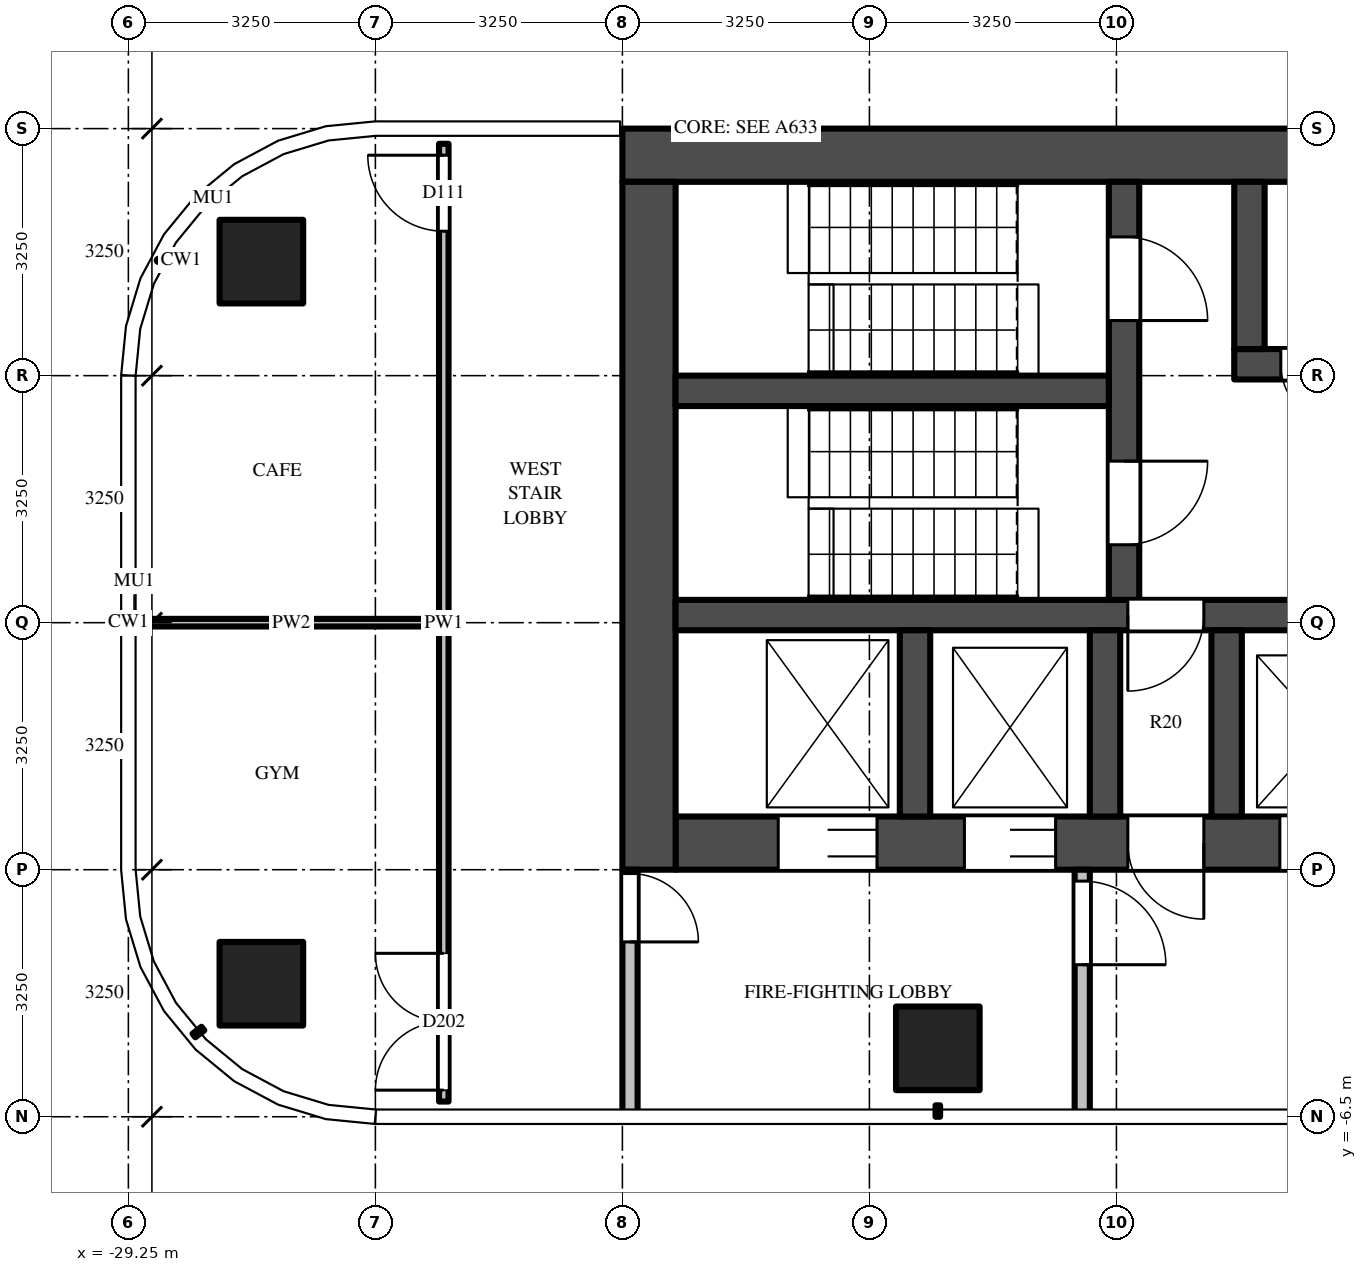
"""IFC4 building model, lengths in metres.
Left out: names, types, materials, properties, quantities, classifications, styles, units other than length and angle.
Written with IfcOpenShell. Run it as: python <this file> out.ifc"""

import sys

from ifc_helpers import new_model, si_unit, direction, frame, frame_2d, origin, origin_2d, place, context, subcontext, project, spatial, rectangle, extrude, source, transform, mapped, element, fill, save


model = new_model("IFC4")
c1 = context("Model", 3, precision=1e-05, world=origin(), true_north=direction((0.0, 1.0)))
c2 = subcontext(c1, "Body", "Model", "MODEL_VIEW")
j1 = project(units=[si_unit("LENGTHUNIT", "METRE"), si_unit("PLANEANGLEUNIT", "RADIAN")], contexts=[c1])
p1 = place(None, origin())
s1 = spatial("IfcSite", under=j1, at=p1, CompositionType="ELEMENT")
p2 = place(p1, origin())
s2 = spatial("IfcBuilding", under=s1, at=p2, CompositionType="ELEMENT")
p3 = place(p2, frame((0.0, 0.0, 255.8)))
s3 = spatial("IfcBuildingStorey", under=s2, at=p3, CompositionType="ELEMENT", Elevation=255.8)
m1 = source(origin(), c2, "Body", "SweptSolid", [
    extrude(rectangle(XDim=1.1, YDim=1.1, at=origin_2d()), origin(), (0.0, 0.0, 1.0), 3.9),
])
for number, where, z_axis, x_axis in (
    (1, (-18.6, -5.6, 0.0), (0.0, 0.0, 1.0), (1.0, 0.0, 0.0)),
    (2, (-27.5, -4.75, 0.0), (0.0, 0.0, 1.0), (1.0, 0.0, 0.0)),
    (3, (-27.5, 4.75, 0.0), (0.0, 0.0, 1.0), (1.0, 0.0, 0.0)),
):
    element("IfcColumn", number, at=place(p3, frame(where, z_axis=z_axis, x_axis=x_axis)), inside=s3, PredefinedType="COLUMN", context=c2, shape_type="MappedRepresentation", body=[
        mapped(m1, transform((0.0, 0.0, 0.0))),
    ])
m2 = source(origin(), c2, "Body", "SweptSolid", [
    extrude(rectangle(XDim=16.6, YDim=0.7, at=frame_2d((8.3, 0.0))), origin(), (0.0, 0.0, 1.0), 3.7),
])
p4 = place(p3, frame((-6.15, 6.15, 0.0), z_axis=(0.0, 0.0, 1.0), x_axis=(-1.0, 0.0, 0.0)))
e4 = element("IfcWall", 4, at=p4, inside=s3, PredefinedType="SHEAR", context=c2, shape_type="MappedRepresentation", body=[
    mapped(m2, transform((0.0, 0.0, 0.0))),
])
m3 = source(origin(), c2, "Body", "SweptSolid", [
    extrude(rectangle(XDim=14.85, YDim=0.7, at=frame_2d((7.425, 0.0))), origin(), (0.0, 0.0, 1.0), 3.7),
])
p5 = place(p3, frame((-7.2, -2.9, 0.0), z_axis=(0.0, 0.0, 1.0), x_axis=(-1.0, 0.0, 0.0)))
e5 = element("IfcWall", 5, at=p5, inside=s3, PredefinedType="SHEAR", context=c2, shape_type="MappedRepresentation", body=[
    mapped(m3, transform((0.0, 0.0, 0.0))),
])
m4 = source(origin(), c2, "Body", "SweptSolid", [
    extrude(rectangle(XDim=1.1, YDim=2.1, at=frame_2d((0.55, 1.05))), frame((0.0, 0.36, 0.0), z_axis=(0.0, -1.0, 0.0), x_axis=(1.0, 0.0, 0.0)), (0.0, 0.0, 1.0), 0.72),
])
p6 = place(p5, frame((0.55, 0.0, 0.0)))
e6 = element("IfcOpeningElement", 6, at=p6, cuts=e5, PredefinedType="OPENING", context=c2, shape_type="MappedRepresentation", body=[
    mapped(m4, transform((0.0, 0.0, 0.0))),
])
p7 = place(p5, frame((3.15, 0.0, 0.0)))
e7 = element("IfcOpeningElement", 7, at=p7, cuts=e5, PredefinedType="OPENING", context=c2, shape_type="MappedRepresentation", body=[
    mapped(m4, transform((0.0, 0.0, 0.0))),
])
m5 = source(origin(), c2, "Body", "SweptSolid", [
    extrude(rectangle(XDim=1.2, YDim=2.1, at=frame_2d((0.6, 1.05))), frame((0.0, 0.36, 0.0), z_axis=(0.0, -1.0, 0.0), x_axis=(1.0, 0.0, 0.0)), (0.0, 0.0, 1.0), 0.72),
])
p8 = place(p5, frame((5.7, 0.0, 0.0)))
e8 = element("IfcOpeningElement", 8, at=p8, cuts=e5, PredefinedType="OPENING", context=c2, shape_type="MappedRepresentation", body=[
    mapped(m5, transform((0.0, 0.0, 0.0))),
])
m6 = source(origin(), c2, "Body", "SweptSolid", [
    extrude(rectangle(XDim=1.3, YDim=2.1, at=frame_2d((0.65, 1.05))), frame((0.0, 0.36, 0.0), z_axis=(0.0, -1.0, 0.0), x_axis=(1.0, 0.0, 0.0)), (0.0, 0.0, 1.0), 0.72),
])
p9 = place(p5, frame((12.2, 0.0, 0.0)))
e9 = element("IfcOpeningElement", 9, at=p9, cuts=e5, PredefinedType="OPENING", context=c2, shape_type="MappedRepresentation", body=[
    mapped(m6, transform((0.0, 0.0, 0.0))),
])
p10 = place(p5, frame((9.85, 0.0, 0.0)))
e10 = element("IfcOpeningElement", 10, at=p10, cuts=e5, PredefinedType="OPENING", context=c2, shape_type="MappedRepresentation", body=[
    mapped(m5, transform((0.0, 0.0, 0.0))),
])
m7 = source(origin(), c2, "Body", "SweptSolid", [
    extrude(rectangle(XDim=1.0, YDim=2.1, at=frame_2d((0.5, 1.05))), frame((0.0, 0.36, 0.0), z_axis=(0.0, -1.0, 0.0), x_axis=(1.0, 0.0, 0.0)), (0.0, 0.0, 1.0), 0.72),
])
p11 = place(p5, frame((7.9, 0.0, 0.0)))
e11 = element("IfcOpeningElement", 11, at=p11, cuts=e5, PredefinedType="OPENING", context=c2, shape_type="MappedRepresentation", body=[
    mapped(m7, transform((0.0, 0.0, 0.0))),
])
m8 = source(origin(), c2, "Body", "SweptSolid", [
    extrude(rectangle(XDim=9.05, YDim=0.7, at=frame_2d((4.525, 0.0))), origin(), (0.0, 0.0, 1.0), 3.7),
])
p12 = place(p3, frame((-22.4, 5.8, 0.0), z_axis=(0.0, 0.0, 1.0), x_axis=(0.0, -1.0, 0.0)))
e12 = element("IfcWall", 12, at=p12, inside=s3, PredefinedType="SHEAR", context=c2, shape_type="MappedRepresentation", body=[
    mapped(m8, transform((0.0, 0.0, 0.0))),
])
m9 = source(origin(), c2, "Body", "SweptSolid", [
    extrude(rectangle(XDim=7.5, YDim=0.4, at=frame_2d((3.75, 0.0))), origin(), (0.0, 0.0, 1.0), 3.7),
])
p13 = place(p3, frame((-7.2, 3.4, 0.0), z_axis=(0.0, 0.0, 1.0), x_axis=(-1.0, 0.0, 0.0)))
e13 = element("IfcWall", 13, at=p13, inside=s3, PredefinedType="SHEAR", context=c2, shape_type="MappedRepresentation", body=[
    mapped(m9, transform((0.0, 0.0, 0.0))),
])
m10 = source(origin(), c2, "Body", "SweptSolid", [
    extrude(rectangle(XDim=0.8, YDim=2.1, at=frame_2d((0.4, 1.05))), frame((0.0, 0.21, 0.0), z_axis=(0.0, -1.0, 0.0), x_axis=(1.0, 0.0, 0.0)), (0.0, 0.0, 1.0), 0.42),
])
p14 = place(p13, frame((0.212, 0.0, 0.0)))
e14 = element("IfcOpeningElement", 14, at=p14, cuts=e13, PredefinedType="OPENING", context=c2, shape_type="MappedRepresentation", body=[
    mapped(m10, transform((0.0, 0.0, 0.0))),
])
m11 = source(origin(), c2, "Body", "SweptSolid", [
    extrude(rectangle(XDim=1.0, YDim=2.1, at=frame_2d((0.5, 1.05))), frame((0.0, 0.21, 0.0), z_axis=(0.0, -1.0, 0.0), x_axis=(1.0, 0.0, 0.0)), (0.0, 0.0, 1.0), 0.42),
])
p15 = place(p13, frame((3.05, 0.0, 0.0)))
e15 = element("IfcOpeningElement", 15, at=p15, cuts=e13, PredefinedType="OPENING", context=c2, shape_type="MappedRepresentation", body=[
    mapped(m11, transform((0.0, 0.0, 0.0))),
])
p16 = place(p13, frame((6.087, 0.0, 0.0)))
e16 = element("IfcOpeningElement", 16, at=p16, cuts=e13, PredefinedType="OPENING", context=c2, shape_type="MappedRepresentation", body=[
    mapped(m10, transform((0.0, 0.0, 0.0))),
])
m12 = source(origin(), c2, "Body", "SweptSolid", [
    extrude(rectangle(XDim=14.85, YDim=0.4, at=frame_2d((7.425, 0.0))), origin(), (0.0, 0.0, 1.0), 3.7),
])
p17 = place(p3, frame((-7.2, 0.1, 0.0), z_axis=(0.0, 0.0, 1.0), x_axis=(-1.0, 0.0, 0.0)))
e17 = element("IfcWall", 17, at=p17, inside=s3, PredefinedType="SHEAR", context=c2, shape_type="MappedRepresentation", body=[
    mapped(m12, transform((0.0, 0.0, 0.0))),
])
p18 = place(p17, frame((7.9, 0.0, 0.0)))
e18 = element("IfcOpeningElement", 18, at=p18, cuts=e17, PredefinedType="OPENING", context=c2, shape_type="MappedRepresentation", body=[
    mapped(m11, transform((0.0, 0.0, 0.0))),
])
m13 = source(origin(), c2, "Body", "SweptSolid", [
    extrude(rectangle(XDim=5.5, YDim=0.4, at=frame_2d((2.75, 0.0))), origin(), (0.0, 0.0, 1.0), 3.7),
])
p19 = place(p3, frame((-16.15, 5.8, 0.0), z_axis=(0.0, 0.0, 1.0), x_axis=(0.0, -1.0, 0.0)))
e19 = element("IfcWall", 19, at=p19, inside=s3, PredefinedType="SHEAR", context=c2, shape_type="MappedRepresentation", body=[
    mapped(m13, transform((0.0, 0.0, 0.0))),
])
m14 = source(origin(), c2, "Body", "SweptSolid", [
    extrude(rectangle(XDim=1.1, YDim=2.1, at=frame_2d((0.55, 1.05))), frame((0.0, 0.21, 0.0), z_axis=(0.0, -1.0, 0.0), x_axis=(1.0, 0.0, 0.0)), (0.0, 0.0, 1.0), 0.42),
])
p20 = place(p19, frame((0.725, 0.0, 0.0)))
e20 = element("IfcOpeningElement", 20, at=p20, cuts=e19, PredefinedType="OPENING", context=c2, shape_type="MappedRepresentation", body=[
    mapped(m14, transform((0.0, 0.0, 0.0))),
])
p21 = place(p19, frame((3.675, 0.0, 0.0)))
e21 = element("IfcOpeningElement", 21, at=p21, cuts=e19, PredefinedType="OPENING", context=c2, shape_type="MappedRepresentation", body=[
    mapped(m14, transform((0.0, 0.0, 0.0))),
])
m15 = source(origin(), c2, "Body", "SweptSolid", [
    extrude(rectangle(XDim=5.7, YDim=0.4, at=frame_2d((2.85, 0.0))), origin(), (0.0, 0.0, 1.0), 3.7),
])
p22 = place(p3, frame((-16.35, 3.05, 0.0), z_axis=(0.0, 0.0, 1.0), x_axis=(-1.0, 0.0, 0.0)))
e22 = element("IfcWall", 22, at=p22, inside=s3, PredefinedType="SHEAR", context=c2, shape_type="MappedRepresentation", body=[
    mapped(m15, transform((0.0, 0.0, 0.0))),
])
m16 = source(origin(), c2, "Body", "SweptSolid", [
    extrude(rectangle(XDim=2.2, YDim=0.4, at=frame_2d((1.1, 0.0))), origin(), (0.0, 0.0, 1.0), 3.7),
])
p23 = place(p3, frame((-14.5, 5.8, 0.0), z_axis=(0.0, 0.0, 1.0), x_axis=(0.0, -1.0, 0.0)))
e23 = element("IfcWall", 23, at=p23, inside=s3, PredefinedType="SHEAR", context=c2, shape_type="MappedRepresentation", body=[
    mapped(m16, transform((0.0, 0.0, 0.0))),
])
m17 = source(origin(), c2, "Body", "SweptSolid", [
    extrude(rectangle(XDim=2.45, YDim=0.4, at=frame_2d((1.225, 0.0))), origin(), (0.0, 0.0, 1.0), 3.7),
])
for number, where, z_axis, x_axis in (
    (24, (-14.8, -0.1, 0.0), (0.0, 0.0, 1.0), (0.0, -1.0, 0.0)),
    (25, (-16.4, -0.1, 0.0), (0.0, 0.0, 1.0), (0.0, -1.0, 0.0)),
    (26, (-18.9, -0.1, 0.0), (0.0, 0.0, 1.0), (0.0, -1.0, 0.0)),
):
    element("IfcWall", number, at=place(p3, frame(where, z_axis=z_axis, x_axis=x_axis)), inside=s3, PredefinedType="SHEAR", context=c2, shape_type="MappedRepresentation", body=[
        mapped(m17, transform((0.0, 0.0, 0.0))),
    ])
m18 = source(origin(), c2, "Body", "SweptSolid", [
    extrude(rectangle(XDim=3.25, YDim=0.2, at=frame_2d((1.625, 0.0))), origin(), (0.0, 0.0, 1.0), 3.7),
])
p24 = place(p3, frame((-16.7, -3.25, 0.0), z_axis=(0.0, 0.0, 1.0), x_axis=(0.0, -1.0, 0.0)))
e27 = element("IfcWall", 27, at=p24, inside=s3, PredefinedType="PARTITIONING", context=c2, shape_type="MappedRepresentation", body=[
    mapped(m18, transform((0.0, 0.0, 0.0))),
])
m19 = source(origin(), c2, "Body", "SweptSolid", [
    extrude(rectangle(XDim=1.1, YDim=2.1, at=frame_2d((0.55, 1.05))), frame((0.0, 0.11, 0.0), z_axis=(0.0, -1.0, 0.0), x_axis=(1.0, 0.0, 0.0)), (0.0, 0.0, 1.0), 0.22),
])
p25 = place(p24, frame((0.15, 0.0, 0.0)))
e28 = element("IfcOpeningElement", 28, at=p25, cuts=e27, PredefinedType="OPENING", context=c2, shape_type="MappedRepresentation", body=[
    mapped(m19, transform((0.0, 0.0, 0.0))),
])
p26 = place(p3, frame((-22.65, -3.25, 0.0), z_axis=(0.0, 0.0, 1.0), x_axis=(0.0, -1.0, 0.0)))
e29 = element("IfcWall", 29, at=p26, inside=s3, PredefinedType="PARTITIONING", context=c2, shape_type="MappedRepresentation", body=[
    mapped(m18, transform((0.0, 0.0, 0.0))),
])
m20 = source(origin(), c2, "Body", "SweptSolid", [
    extrude(rectangle(XDim=0.9, YDim=2.1, at=frame_2d((0.45, 1.05))), frame((0.0, 0.11, 0.0), z_axis=(0.0, -1.0, 0.0), x_axis=(1.0, 0.0, 0.0)), (0.0, 0.0, 1.0), 0.22),
])
p27 = place(p26, frame((0.05, 0.0, 0.0)))
e30 = element("IfcOpeningElement", 30, at=p27, cuts=e29, PredefinedType="OPENING", context=c2, shape_type="MappedRepresentation", body=[
    mapped(m20, transform((0.0, 0.0, 0.0))),
])
m21 = source(origin(), c2, "Body", "SweptSolid", [
    extrude(rectangle(XDim=12.6, YDim=0.125, at=frame_2d((6.3, 0.0))), origin(), (0.0, 0.0, 1.0), 2.78),
])
p28 = place(p3, frame((-25.1, -6.3, 0.0), z_axis=(0.0, 0.0, 1.0), x_axis=(0.0, 1.0, 0.0)))
e31 = element("IfcWall", 31, at=p28, inside=s3, PredefinedType="PARTITIONING", context=c2, shape_type="MappedRepresentation", body=[
    mapped(m21, transform((0.0, 0.0, 0.0))),
])
m22 = source(origin(), c2, "Body", "SweptSolid", [
    extrude(rectangle(XDim=1.8, YDim=2.1, at=frame_2d((0.9, 1.05))), frame((0.0, 0.073, 0.0), z_axis=(0.0, -1.0, 0.0), x_axis=(1.0, 0.0, 0.0)), (0.0, 0.0, 1.0), 0.145),
])
p29 = place(p28, frame((0.15, 0.0, 0.0)))
e32 = element("IfcOpeningElement", 32, at=p29, cuts=e31, PredefinedType="OPENING", context=c2, shape_type="MappedRepresentation", body=[
    mapped(m22, transform((0.0, 0.0, 0.0))),
])
m23 = source(origin(), c2, "Body", "SweptSolid", [
    extrude(rectangle(XDim=1.0, YDim=2.1, at=frame_2d((0.5, 1.05))), frame((0.0, 0.073, 0.0), z_axis=(0.0, -1.0, 0.0), x_axis=(1.0, 0.0, 0.0)), (0.0, 0.0, 1.0), 0.145),
])
p30 = place(p28, frame((11.45, 0.0, 0.0)))
e33 = element("IfcOpeningElement", 33, at=p30, cuts=e31, PredefinedType="OPENING", context=c2, shape_type="MappedRepresentation", body=[
    mapped(m23, transform((0.0, 0.0, 0.0))),
])
m24 = source(origin(), c2, "Body", "SweptSolid", [
    extrude(rectangle(XDim=3.887, YDim=0.1, at=frame_2d((1.944, 0.0))), origin(), (0.0, 0.0, 1.0), 2.78),
])
p31 = place(p3, frame((-29.05, 0.0, 0.0), z_axis=(0.0, 0.0, 1.0), x_axis=(1.0, 0.0, 0.0)))
e34 = element("IfcWall", 34, at=p31, inside=s3, PredefinedType="PARTITIONING", context=c2, shape_type="MappedRepresentation", body=[
    mapped(m24, transform((0.0, 0.0, 0.0))),
])
m25 = source(origin(), c2, "Body", "SweptSolid", [
    extrude(rectangle(XDim=1.2, YDim=2.1, at=frame_2d((0.6, 1.05))), frame((0.0, -0.275, 0.0), z_axis=(0.0, -1.0, 0.0), x_axis=(1.0, 0.0, 0.0)), (0.0, 0.0, 1.0), 0.05),
])
p32 = place(p8, origin())
e35 = element("IfcDoor", 35, at=p32, inside=s3, OperationType="DOUBLE_DOOR_SLIDING", PredefinedType="DOOR", context=c2, shape_type="MappedRepresentation", body=[
    mapped(m25, transform((0.0, 0.0, 0.0))),
])
fill(e8, e35)
m26 = source(origin(), c2, "Body", "SweptSolid", [
    extrude(rectangle(XDim=1.3, YDim=2.1, at=frame_2d((0.65, 1.05))), frame((0.0, -0.275, 0.0), z_axis=(0.0, -1.0, 0.0), x_axis=(1.0, 0.0, 0.0)), (0.0, 0.0, 1.0), 0.05),
])
p33 = place(p9, origin())
e36 = element("IfcDoor", 36, at=p33, inside=s3, OperationType="DOUBLE_DOOR_SLIDING", PredefinedType="DOOR", context=c2, shape_type="MappedRepresentation", body=[
    mapped(m26, transform((0.0, 0.0, 0.0))),
])
fill(e9, e36)
p34 = place(p10, origin())
e37 = element("IfcDoor", 37, at=p34, inside=s3, OperationType="DOUBLE_DOOR_SLIDING", PredefinedType="DOOR", context=c2, shape_type="MappedRepresentation", body=[
    mapped(m25, transform((0.0, 0.0, 0.0))),
])
fill(e10, e37)
m27 = source(origin(), c2, "Body", "SweptSolid", [
    extrude(rectangle(XDim=1.1, YDim=2.1, at=frame_2d((0.55, 1.05))), frame((0.0, 0.025, 0.0), z_axis=(0.0, -1.0, 0.0), x_axis=(1.0, 0.0, 0.0)), (0.0, 0.0, 1.0), 0.05),
])
p35 = place(p20, origin())
e38 = element("IfcDoor", 38, at=p35, inside=s3, OperationType="SINGLE_SWING_RIGHT", PredefinedType="DOOR", context=c2, shape_type="MappedRepresentation", body=[
    mapped(m27, transform((0.0, 0.0, 0.0))),
])
fill(e20, e38)
p36 = place(p21, origin())
e39 = element("IfcDoor", 39, at=p36, inside=s3, OperationType="SINGLE_SWING_LEFT", PredefinedType="DOOR", context=c2, shape_type="MappedRepresentation", body=[
    mapped(m27, transform((0.0, 0.0, 0.0))),
])
fill(e21, e39)
m28 = source(origin(), c2, "Body", "SweptSolid", [
    extrude(rectangle(XDim=1.0, YDim=2.1, at=frame_2d((0.5, 1.05))), frame((0.0, 0.025, 0.0), z_axis=(0.0, -1.0, 0.0), x_axis=(1.0, 0.0, 0.0)), (0.0, 0.0, 1.0), 0.05),
])
p37 = place(p18, origin())
e40 = element("IfcDoor", 40, at=p37, inside=s3, OperationType="SINGLE_SWING_RIGHT", PredefinedType="DOOR", context=c2, shape_type="MappedRepresentation", body=[
    mapped(m28, transform((0.0, 0.0, 0.0))),
])
fill(e18, e40)
m29 = source(origin(), c2, "Body", "SweptSolid", [
    extrude(rectangle(XDim=1.0, YDim=2.1, at=frame_2d((0.5, 1.05))), frame((0.0, -0.275, 0.0), z_axis=(0.0, -1.0, 0.0), x_axis=(1.0, 0.0, 0.0)), (0.0, 0.0, 1.0), 0.05),
])
p38 = place(p11, origin())
e41 = element("IfcDoor", 41, at=p38, inside=s3, OperationType="SINGLE_SWING_LEFT", PredefinedType="DOOR", context=c2, shape_type="MappedRepresentation", body=[
    mapped(m29, transform((0.0, 0.0, 0.0))),
])
fill(e11, e41)
p39 = place(p25, origin())
e42 = element("IfcDoor", 42, at=p39, inside=s3, OperationType="SINGLE_SWING_RIGHT", PredefinedType="DOOR", context=c2, shape_type="MappedRepresentation", body=[
    mapped(m27, transform((0.0, 0.0, 0.0))),
])
fill(e28, e42)
m30 = source(origin(), c2, "Body", "SweptSolid", [
    extrude(rectangle(XDim=0.9, YDim=2.1, at=frame_2d((0.45, 1.05))), frame((0.0, 0.025, 0.0), z_axis=(0.0, -1.0, 0.0), x_axis=(1.0, 0.0, 0.0)), (0.0, 0.0, 1.0), 0.05),
])
p40 = place(p27, origin())
e43 = element("IfcDoor", 43, at=p40, inside=s3, OperationType="SINGLE_SWING_RIGHT", PredefinedType="DOOR", context=c2, shape_type="MappedRepresentation", body=[
    mapped(m30, transform((0.0, 0.0, 0.0))),
])
fill(e30, e43)
m31 = source(origin(), c2, "Body", "SweptSolid", [
    extrude(rectangle(XDim=0.8, YDim=2.1, at=frame_2d((0.4, 1.05))), frame((0.0, 0.025, 0.0), z_axis=(0.0, -1.0, 0.0), x_axis=(1.0, 0.0, 0.0)), (0.0, 0.0, 1.0), 0.05),
])
p41 = place(p16, origin())
e44 = element("IfcDoor", 44, at=p41, inside=s3, OperationType="SINGLE_SWING_LEFT", PredefinedType="DOOR", context=c2, shape_type="MappedRepresentation", body=[
    mapped(m31, transform((0.0, 0.0, 0.0))),
])
fill(e16, e44)
m32 = source(origin(), c2, "Body", "SweptSolid", [
    extrude(rectangle(XDim=1.8, YDim=2.1, at=frame_2d((0.9, 1.05))), frame((0.0, 0.025, 0.0), z_axis=(0.0, -1.0, 0.0), x_axis=(1.0, 0.0, 0.0)), (0.0, 0.0, 1.0), 0.05),
])
p42 = place(p29, origin())
e45 = element("IfcDoor", 45, at=p42, inside=s3, OperationType="DOUBLE_DOOR_SINGLE_SWING", PredefinedType="DOOR", context=c2, shape_type="MappedRepresentation", body=[
    mapped(m32, transform((0.0, 0.0, 0.0))),
])
fill(e32, e45)
p43 = place(p30, origin())
e46 = element("IfcDoor", 46, at=p43, inside=s3, OperationType="SINGLE_SWING_RIGHT", PredefinedType="DOOR", context=c2, shape_type="MappedRepresentation", body=[
    mapped(m28, transform((0.0, 0.0, 0.0))),
])
fill(e33, e46)
save(model, sys.argv[1])
